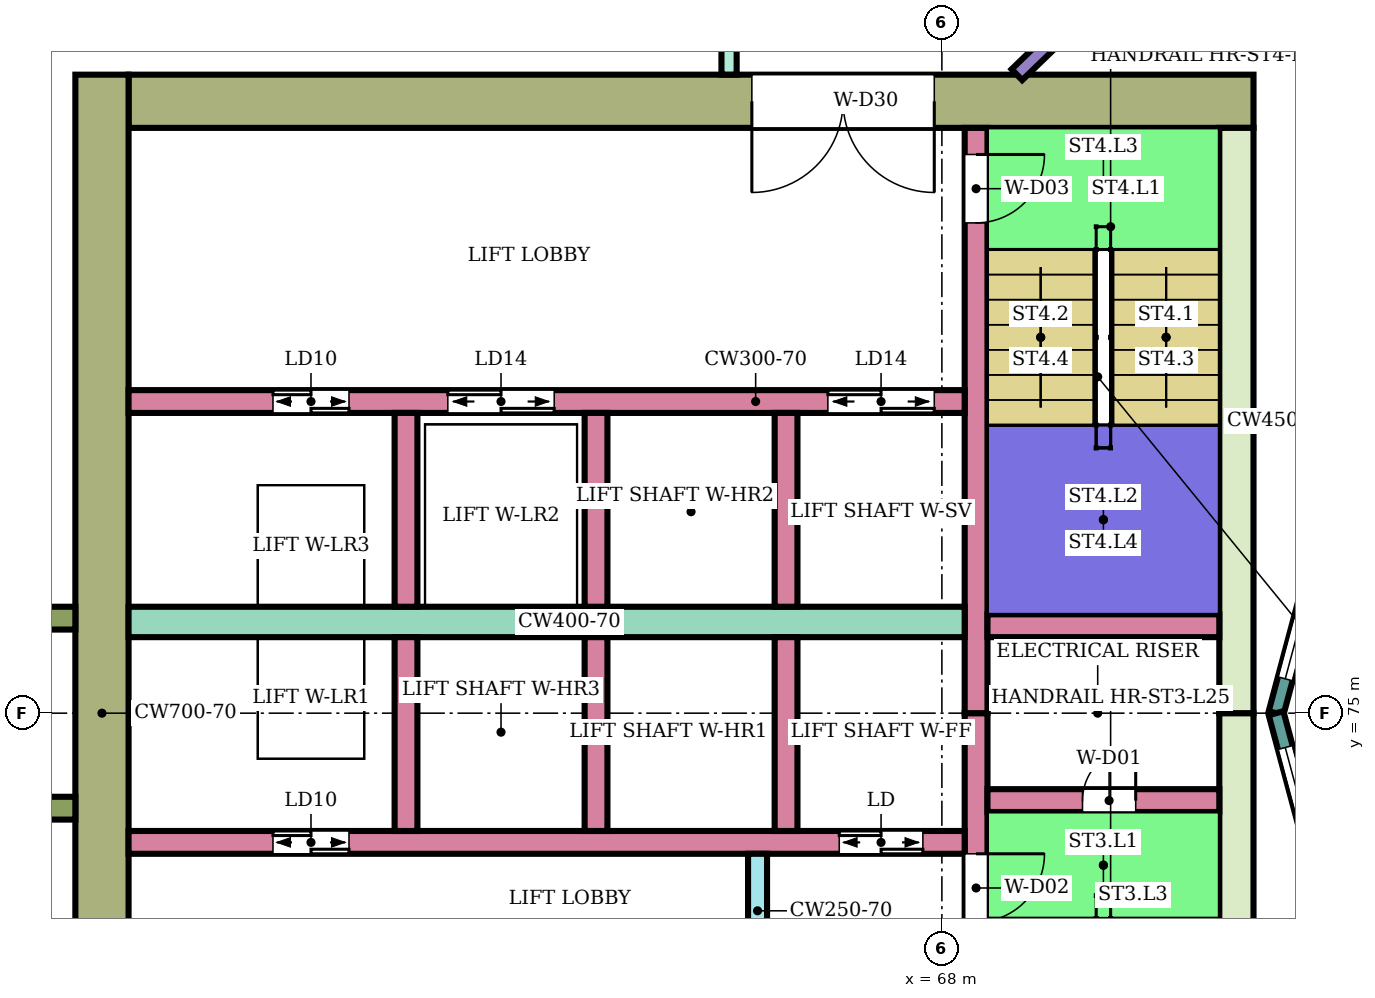
"""IFC4 building model, lengths in metres.
Left out: names, types, materials, properties, quantities, classifications, styles, units other than length and angle.
Written with IfcOpenShell. Run it as: python <this file> out.ifc"""

import sys

from ifc_helpers import new_model, si_unit, direction, frame, frame_2d, origin, place, context, subcontext, project, spatial, rectangle, extrude, element, fill, save


model = new_model("IFC4")
c1 = context("Model", 3, precision=1e-05, world=origin(), true_north=direction((0.0, 1.0)))
c2 = subcontext(c1, "Body", "Model", "MODEL_VIEW")
j1 = project(units=[si_unit("LENGTHUNIT", "METRE"), si_unit("PLANEANGLEUNIT", "RADIAN")], contexts=[c1])
p1 = place(None, origin())
s1 = spatial("IfcSite", under=j1, at=p1, CompositionType="ELEMENT")
p2 = place(p1, origin())
s2 = spatial("IfcBuilding", under=s1, at=p2, CompositionType="ELEMENT")
p3 = place(p2, frame((0.0, 0.0, 109.0)))
s3 = spatial("IfcBuildingStorey", under=s2, at=p3, CompositionType="ELEMENT", Elevation=109.0)
p4 = place(p3, frame((72.1, 83.05, 0.0), z_axis=(0.0, 0.0, 1.0), x_axis=(-1.0, 0.0, 0.0)))
e1 = element("IfcWall", 1, at=p4, inside=s3, PredefinedType="SHEAR", context=c2, shape_type="SweptSolid", body=[
    extrude(rectangle(XDim=14.8, YDim=0.7, at=frame_2d((7.4, 0.0))), origin(), (0.0, 0.0, 1.0), 5.28),
])
p5 = place(p4, frame((4.2, 0.0, 0.0)))
e2 = element("IfcOpeningElement", 2, at=p5, cuts=e1, PredefinedType="OPENING", context=c2, shape_type="SweptSolid", body=[
    extrude(rectangle(XDim=2.4, YDim=2.4, at=frame_2d((1.2, 1.2))), frame((0.0, 0.36, 0.0), z_axis=(0.0, -1.0, 0.0), x_axis=(1.0, 0.0, 0.0)), (0.0, 0.0, 1.0), 0.72),
])
for number, where, z_axis, x_axis in (
    (3, (71.875, 75.0, 0.0), (0.0, 0.0, 1.0), (0.0, -1.0, 0.0)),
    (4, (71.875, 82.7, 0.0), (0.0, 0.0, 1.0), (0.0, -1.0, 0.0)),
):
    element("IfcWall", number, at=place(p3, frame(where, z_axis=z_axis, x_axis=x_axis)), inside=s3, PredefinedType="SHEAR", context=c2, shape_type="SweptSolid", body=[
        extrude(rectangle(XDim=7.7, YDim=0.45, at=frame_2d((3.85, 0.0))), origin(), (0.0, 0.0, 1.0), 5.28),
    ])
p6 = place(p3, frame((56.95, 83.4, 0.0), z_axis=(0.0, 0.0, 1.0), x_axis=(0.0, -1.0, 0.0)))
e5 = element("IfcWall", 5, at=p6, inside=s3, PredefinedType="SHEAR", context=c2, shape_type="SweptSolid", body=[
    extrude(rectangle(XDim=16.8, YDim=0.7, at=frame_2d((8.4, 0.0))), origin(), (0.0, 0.0, 1.0), 5.28),
])
p7 = place(p3, frame((68.45, 75.0, 0.0), z_axis=(0.0, 0.0, 1.0), x_axis=(0.0, -1.0, 0.0)))
e6 = element("IfcWall", 6, at=p7, inside=s3, PredefinedType="SHEAR", context=c2, shape_type="SweptSolid", body=[
    extrude(rectangle(XDim=7.7, YDim=0.3, at=frame_2d((3.85, 0.0))), origin(), (0.0, 0.0, 1.0), 5.28),
])
p8 = place(p7, frame((1.85, 0.0, 0.0)))
e7 = element("IfcOpeningElement", 7, at=p8, cuts=e6, PredefinedType="OPENING", context=c2, shape_type="SweptSolid", body=[
    extrude(rectangle(XDim=0.9, YDim=2.1, at=frame_2d((0.45, 1.05))), frame((0.0, 0.16, 0.0), z_axis=(0.0, -1.0, 0.0), x_axis=(1.0, 0.0, 0.0)), (0.0, 0.0, 1.0), 0.32),
])
p9 = place(p3, frame((68.45, 82.7, 0.0), z_axis=(0.0, 0.0, 1.0), x_axis=(0.0, -1.0, 0.0)))
e8 = element("IfcWall", 8, at=p9, inside=s3, PredefinedType="SHEAR", context=c2, shape_type="SweptSolid", body=[
    extrude(rectangle(XDim=7.7, YDim=0.3, at=frame_2d((3.85, 0.0))), origin(), (0.0, 0.0, 1.0), 5.28),
])
p10 = place(p9, frame((0.35, 0.0, 0.0)))
e9 = element("IfcOpeningElement", 9, at=p10, cuts=e8, PredefinedType="OPENING", context=c2, shape_type="SweptSolid", body=[
    extrude(rectangle(XDim=0.9, YDim=2.1, at=frame_2d((0.45, 1.05))), frame((0.0, 0.16, 0.0), z_axis=(0.0, -1.0, 0.0), x_axis=(1.0, 0.0, 0.0)), (0.0, 0.0, 1.0), 0.32),
])
p11 = place(p3, frame((71.65, 73.85, 0.0), z_axis=(0.0, 0.0, 1.0), x_axis=(-1.0, 0.0, 0.0)))
e10 = element("IfcWall", 10, at=p11, inside=s3, PredefinedType="SHEAR", context=c2, shape_type="SweptSolid", body=[
    extrude(rectangle(XDim=3.05, YDim=0.3, at=frame_2d((1.525, 0.0))), origin(), (0.0, 0.0, 1.0), 5.28),
])
p12 = place(p11, frame((1.1, 0.0, 0.0)))
e11 = element("IfcOpeningElement", 11, at=p12, cuts=e10, PredefinedType="OPENING", context=c2, shape_type="SweptSolid", body=[
    extrude(rectangle(XDim=0.7, YDim=2.0, at=frame_2d((0.35, 1.0))), frame((0.0, 0.16, 0.0), z_axis=(0.0, -1.0, 0.0), x_axis=(1.0, 0.0, 0.0)), (0.0, 0.0, 1.0), 0.32),
])
p13 = place(p3, frame((71.65, 76.15, 0.0), z_axis=(0.0, 0.0, 1.0), x_axis=(-1.0, 0.0, 0.0)))
e12 = element("IfcWall", 12, at=p13, inside=s3, PredefinedType="SHEAR", context=c2, shape_type="SweptSolid", body=[
    extrude(rectangle(XDim=3.05, YDim=0.3, at=frame_2d((1.525, 0.0))), origin(), (0.0, 0.0, 1.0), 5.28),
])
p14 = place(p3, frame((68.3, 73.3, 0.0), z_axis=(0.0, 0.0, 1.0), x_axis=(-1.0, 0.0, 0.0)))
e13 = element("IfcWall", 13, at=p14, inside=s3, PredefinedType="SHEAR", context=c2, shape_type="SweptSolid", body=[
    extrude(rectangle(XDim=11.0, YDim=0.3, at=frame_2d((5.5, 0.0))), origin(), (0.0, 0.0, 1.0), 5.28),
])
p15 = place(p14, frame((0.55, 0.0, 0.0)))
e14 = element("IfcOpeningElement", 14, at=p15, cuts=e13, PredefinedType="OPENING", context=c2, shape_type="SweptSolid", body=[
    extrude(rectangle(XDim=1.1, YDim=2.1, at=frame_2d((0.55, 1.05))), frame((0.0, 0.16, 0.0), z_axis=(0.0, -1.0, 0.0), x_axis=(1.0, 0.0, 0.0)), (0.0, 0.0, 1.0), 0.32),
])
p16 = place(p14, frame((8.1, 0.0, 0.0)))
e15 = element("IfcOpeningElement", 15, at=p16, cuts=e13, PredefinedType="OPENING", context=c2, shape_type="SweptSolid", body=[
    extrude(rectangle(XDim=1.0, YDim=2.1, at=frame_2d((0.5, 1.05))), frame((0.0, 0.16, 0.0), z_axis=(0.0, -1.0, 0.0), x_axis=(1.0, 0.0, 0.0)), (0.0, 0.0, 1.0), 0.32),
])
p17 = place(p3, frame((68.3, 76.2, 0.0), z_axis=(0.0, 0.0, 1.0), x_axis=(-1.0, 0.0, 0.0)))
e16 = element("IfcWall", 16, at=p17, inside=s3, PredefinedType="SHEAR", context=c2, shape_type="SweptSolid", body=[
    extrude(rectangle(XDim=11.0, YDim=0.4, at=frame_2d((5.5, 0.0))), origin(), (0.0, 0.0, 1.0), 5.28),
])
p18 = place(p3, frame((68.3, 79.1, 0.0), z_axis=(0.0, 0.0, 1.0), x_axis=(-1.0, 0.0, 0.0)))
e17 = element("IfcWall", 17, at=p18, inside=s3, PredefinedType="SHEAR", context=c2, shape_type="SweptSolid", body=[
    extrude(rectangle(XDim=11.0, YDim=0.3, at=frame_2d((5.5, 0.0))), origin(), (0.0, 0.0, 1.0), 5.28),
])
p19 = place(p18, frame((0.4, 0.0, 0.0)))
e18 = element("IfcOpeningElement", 18, at=p19, cuts=e17, PredefinedType="OPENING", context=c2, shape_type="SweptSolid", body=[
    extrude(rectangle(XDim=1.4, YDim=2.1, at=frame_2d((0.7, 1.05))), frame((0.0, 0.16, 0.0), z_axis=(0.0, -1.0, 0.0), x_axis=(1.0, 0.0, 0.0)), (0.0, 0.0, 1.0), 0.32),
])
p20 = place(p18, frame((5.4, 0.0, 0.0)))
e19 = element("IfcOpeningElement", 19, at=p20, cuts=e17, PredefinedType="OPENING", context=c2, shape_type="SweptSolid", body=[
    extrude(rectangle(XDim=1.4, YDim=2.1, at=frame_2d((0.7, 1.05))), frame((0.0, 0.16, 0.0), z_axis=(0.0, -1.0, 0.0), x_axis=(1.0, 0.0, 0.0)), (0.0, 0.0, 1.0), 0.32),
])
p21 = place(p18, frame((8.1, 0.0, 0.0)))
e20 = element("IfcOpeningElement", 20, at=p21, cuts=e17, PredefinedType="OPENING", context=c2, shape_type="SweptSolid", body=[
    extrude(rectangle(XDim=1.0, YDim=2.1, at=frame_2d((0.5, 1.05))), frame((0.0, 0.16, 0.0), z_axis=(0.0, -1.0, 0.0), x_axis=(1.0, 0.0, 0.0)), (0.0, 0.0, 1.0), 0.32),
])
for number, where, z_axis, x_axis in (
    (21, (65.95, 76.0, 0.0), (0.0, 0.0, 1.0), (0.0, -1.0, 0.0)),
    (22, (63.45, 76.0, 0.0), (0.0, 0.0, 1.0), (0.0, -1.0, 0.0)),
    (23, (60.95, 76.0, 0.0), (0.0, 0.0, 1.0), (0.0, -1.0, 0.0)),
    (24, (65.95, 78.95, 0.0), (0.0, 0.0, 1.0), (0.0, -1.0, 0.0)),
    (25, (63.45, 78.95, 0.0), (0.0, 0.0, 1.0), (0.0, -1.0, 0.0)),
    (26, (60.95, 78.95, 0.0), (0.0, 0.0, 1.0), (0.0, -1.0, 0.0)),
):
    element("IfcWall", number, at=place(p3, frame(where, z_axis=z_axis, x_axis=x_axis)), inside=s3, PredefinedType="SHEAR", context=c2, shape_type="SweptSolid", body=[
        extrude(rectangle(XDim=2.55, YDim=0.3, at=frame_2d((1.275, 0.0))), origin(), (0.0, 0.0, 1.0), 5.28),
    ])
p22 = place(p3, frame((65.575, 73.15, 0.0), z_axis=(0.0, 0.0, 1.0), x_axis=(0.0, -1.0, 0.0)))
e27 = element("IfcWall", 27, at=p22, inside=s3, PredefinedType="SHEAR", context=c2, shape_type="SweptSolid", body=[
    extrude(rectangle(XDim=1.5, YDim=0.25, at=frame_2d((0.75, 0.0))), origin(), (0.0, 0.0, 1.0), 5.28),
])
for number, where, z_axis, x_axis in (
    (28, (56.6, 76.25, 0.0), (0.0, 0.0, 1.0), (-1.0, 0.0, 0.0)),
    (29, (56.6, 73.75, 0.0), (0.0, 0.0, 1.0), (-1.0, 0.0, 0.0)),
):
    element("IfcWall", number, at=place(p3, frame(where, z_axis=z_axis, x_axis=x_axis)), inside=s3, PredefinedType="NOTDEFINED", context=c2, shape_type="SweptSolid", body=[
        extrude(rectangle(XDim=2.416, YDim=0.3, at=frame_2d((1.208, 0.0))), origin(), (0.0, 0.0, 1.0), 5.6),
    ])
p23 = place(p3, frame((73.415, 78.802, 0.0), z_axis=(0.0, 0.0, 1.0), x_axis=(-0.258789828301, -0.965933654434, 0.0)))
e30 = element("IfcWall", 30, at=p23, inside=s3, PredefinedType="NOTDEFINED", context=c2, shape_type="SweptSolid", body=[
    extrude(rectangle(XDim=3.936, YDim=0.2, at=frame_2d((1.968, 0.0))), origin(), (0.0, 0.0, 1.0), 5.6),
])
p24 = place(p23, frame((0.468, 0.0, 0.9)))
e31 = element("IfcOpeningElement", 31, at=p24, cuts=e30, PredefinedType="OPENING", context=c2, shape_type="SweptSolid", body=[
    extrude(rectangle(XDim=3.0, YDim=2.3, at=frame_2d((1.5, 1.15))), frame((0.0, 0.11, 0.0), z_axis=(0.0, -1.0, 0.0), x_axis=(1.0, 0.0, 0.0)), (0.0, 0.0, 1.0), 0.22),
])
p25 = place(p3, frame((72.396, 75.0, 0.0), z_axis=(0.0, 0.0, 1.0), x_axis=(0.258789828301, -0.965933654434, 0.0)))
e32 = element("IfcWall", 32, at=p25, inside=s3, PredefinedType="NOTDEFINED", context=c2, shape_type="SweptSolid", body=[
    extrude(rectangle(XDim=3.936, YDim=0.2, at=frame_2d((1.968, 0.0))), origin(), (0.0, 0.0, 1.0), 5.6),
])
p26 = place(p25, frame((0.468, 0.0, 0.9)))
e33 = element("IfcOpeningElement", 33, at=p26, cuts=e32, PredefinedType="OPENING", context=c2, shape_type="SweptSolid", body=[
    extrude(rectangle(XDim=3.0, YDim=2.3, at=frame_2d((1.5, 1.15))), frame((0.0, 0.11, 0.0), z_axis=(0.0, -1.0, 0.0), x_axis=(1.0, 0.0, 0.0)), (0.0, 0.0, 1.0), 0.22),
])
p27 = place(p3, frame((68.987, 83.4, 0.0), z_axis=(0.0, 0.0, 1.0), x_axis=(0.719547721855, 0.694442996922, 0.0)))
e34 = element("IfcWall", 34, at=p27, inside=s3, PredefinedType="PARTITIONING", context=c2, shape_type="SweptSolid", body=[
    extrude(rectangle(XDim=5.378, YDim=0.2, at=frame_2d((2.689, 0.0))), origin(), (0.0, 0.0, 1.0), 5.15),
])
p28 = place(p27, frame((2.144, 0.0, 0.0)))
e35 = element("IfcOpeningElement", 35, at=p28, cuts=e34, PredefinedType="OPENING", context=c2, shape_type="SweptSolid", body=[
    extrude(rectangle(XDim=1.2, YDim=2.4, at=frame_2d((0.6, 1.2))), frame((0.0, 0.11, 0.0), z_axis=(0.0, -1.0, 0.0), x_axis=(1.0, 0.0, 0.0)), (0.0, 0.0, 1.0), 0.22),
])
p29 = place(p3, frame((65.2, 83.401, 0.0), z_axis=(0.0, 0.0, 1.0), x_axis=(0.0, 1.0, 0.0)))
e36 = element("IfcWall", 36, at=p29, inside=s3, PredefinedType="PARTITIONING", context=c2, shape_type="SweptSolid", body=[
    extrude(rectangle(XDim=1.399, YDim=0.2, at=frame_2d((0.7, 0.0))), origin(), (0.0, 0.0, 1.0), 5.15),
])
p30 = place(p24, origin())
e37 = element("IfcWindow", 37, at=p30, inside=s3, PartitioningType="SINGLE_PANEL", PredefinedType="WINDOW", context=c2, shape_type="SweptSolid", body=[
    extrude(rectangle(XDim=3.0, YDim=2.3, at=frame_2d((1.5, 1.15))), frame((0.0, 0.03, 0.0), z_axis=(0.0, -1.0, 0.0), x_axis=(1.0, 0.0, 0.0)), (0.0, 0.0, 1.0), 0.06),
])
fill(e31, e37)
p31 = place(p26, origin())
e38 = element("IfcWindow", 38, at=p31, inside=s3, PartitioningType="SINGLE_PANEL", PredefinedType="WINDOW", context=c2, shape_type="SweptSolid", body=[
    extrude(rectangle(XDim=3.0, YDim=2.3, at=frame_2d((1.5, 1.15))), frame((0.0, 0.03, 0.0), z_axis=(0.0, -1.0, 0.0), x_axis=(1.0, 0.0, 0.0)), (0.0, 0.0, 1.0), 0.06),
])
fill(e33, e38)
p32 = place(p12, frame((0.7, 0.0, 0.0), z_axis=(0.0, 0.0, 1.0), x_axis=(-1.0, 0.0, 0.0)))
e39 = element("IfcDoor", 39, at=p32, inside=s3, OperationType="SINGLE_SWING_RIGHT", PredefinedType="DOOR", context=c2, shape_type="SweptSolid", body=[
    extrude(rectangle(XDim=0.7, YDim=2.0, at=frame_2d((0.35, 1.0))), frame((0.0, 0.025, 0.0), z_axis=(0.0, -1.0, 0.0), x_axis=(1.0, 0.0, 0.0)), (0.0, 0.0, 1.0), 0.05),
])
fill(e11, e39)
p33 = place(p8, origin())
e40 = element("IfcDoor", 40, at=p33, inside=s3, OperationType="SINGLE_SWING_LEFT", PredefinedType="DOOR", context=c2, shape_type="SweptSolid", body=[
    extrude(rectangle(XDim=0.9, YDim=2.1, at=frame_2d((0.45, 1.05))), frame((0.0, 0.025, 0.0), z_axis=(0.0, -1.0, 0.0), x_axis=(1.0, 0.0, 0.0)), (0.0, 0.0, 1.0), 0.05),
])
fill(e7, e40)
p34 = place(p10, origin())
e41 = element("IfcDoor", 41, at=p34, inside=s3, OperationType="SINGLE_SWING_LEFT", PredefinedType="DOOR", context=c2, shape_type="SweptSolid", body=[
    extrude(rectangle(XDim=0.9, YDim=2.1, at=frame_2d((0.45, 1.05))), frame((0.0, 0.025, 0.0), z_axis=(0.0, -1.0, 0.0), x_axis=(1.0, 0.0, 0.0)), (0.0, 0.0, 1.0), 0.05),
])
fill(e9, e41)
p35 = place(p15, origin())
e42 = element("IfcDoor", 42, at=p35, inside=s3, OperationType="DOUBLE_DOOR_SLIDING", PredefinedType="DOOR", context=c2, shape_type="SweptSolid", body=[
    extrude(rectangle(XDim=1.1, YDim=2.1, at=frame_2d((0.55, 1.05))), frame((0.0, 0.025, 0.0), z_axis=(0.0, -1.0, 0.0), x_axis=(1.0, 0.0, 0.0)), (0.0, 0.0, 1.0), 0.05),
])
fill(e14, e42)
p36 = place(p16, origin())
e43 = element("IfcDoor", 43, at=p36, inside=s3, OperationType="DOUBLE_DOOR_SLIDING", PredefinedType="DOOR", context=c2, shape_type="SweptSolid", body=[
    extrude(rectangle(XDim=1.0, YDim=2.1, at=frame_2d((0.5, 1.05))), frame((0.0, 0.025, 0.0), z_axis=(0.0, -1.0, 0.0), x_axis=(1.0, 0.0, 0.0)), (0.0, 0.0, 1.0), 0.05),
])
fill(e15, e43)
p37 = place(p19, origin())
e44 = element("IfcDoor", 44, at=p37, inside=s3, OperationType="DOUBLE_DOOR_SLIDING", PredefinedType="DOOR", context=c2, shape_type="SweptSolid", body=[
    extrude(rectangle(XDim=1.4, YDim=2.1, at=frame_2d((0.7, 1.05))), frame((0.0, 0.025, 0.0), z_axis=(0.0, -1.0, 0.0), x_axis=(1.0, 0.0, 0.0)), (0.0, 0.0, 1.0), 0.05),
])
fill(e18, e44)
p38 = place(p20, origin())
e45 = element("IfcDoor", 45, at=p38, inside=s3, OperationType="DOUBLE_DOOR_SLIDING", PredefinedType="DOOR", context=c2, shape_type="SweptSolid", body=[
    extrude(rectangle(XDim=1.4, YDim=2.1, at=frame_2d((0.7, 1.05))), frame((0.0, 0.025, 0.0), z_axis=(0.0, -1.0, 0.0), x_axis=(1.0, 0.0, 0.0)), (0.0, 0.0, 1.0), 0.05),
])
fill(e19, e45)
p39 = place(p21, origin())
e46 = element("IfcDoor", 46, at=p39, inside=s3, OperationType="DOUBLE_DOOR_SLIDING", PredefinedType="DOOR", context=c2, shape_type="SweptSolid", body=[
    extrude(rectangle(XDim=1.0, YDim=2.1, at=frame_2d((0.5, 1.05))), frame((0.0, 0.025, 0.0), z_axis=(0.0, -1.0, 0.0), x_axis=(1.0, 0.0, 0.0)), (0.0, 0.0, 1.0), 0.05),
])
fill(e20, e46)
p40 = place(p5, origin())
e47 = element("IfcDoor", 47, at=p40, inside=s3, OperationType="DOUBLE_DOOR_SINGLE_SWING", PredefinedType="DOOR", context=c2, shape_type="SweptSolid", body=[
    extrude(rectangle(XDim=2.4, YDim=2.4, at=frame_2d((1.2, 1.2))), frame((0.0, 0.025, 0.0), z_axis=(0.0, -1.0, 0.0), x_axis=(1.0, 0.0, 0.0)), (0.0, 0.0, 1.0), 0.05),
])
fill(e2, e47)
save(model, sys.argv[1])
